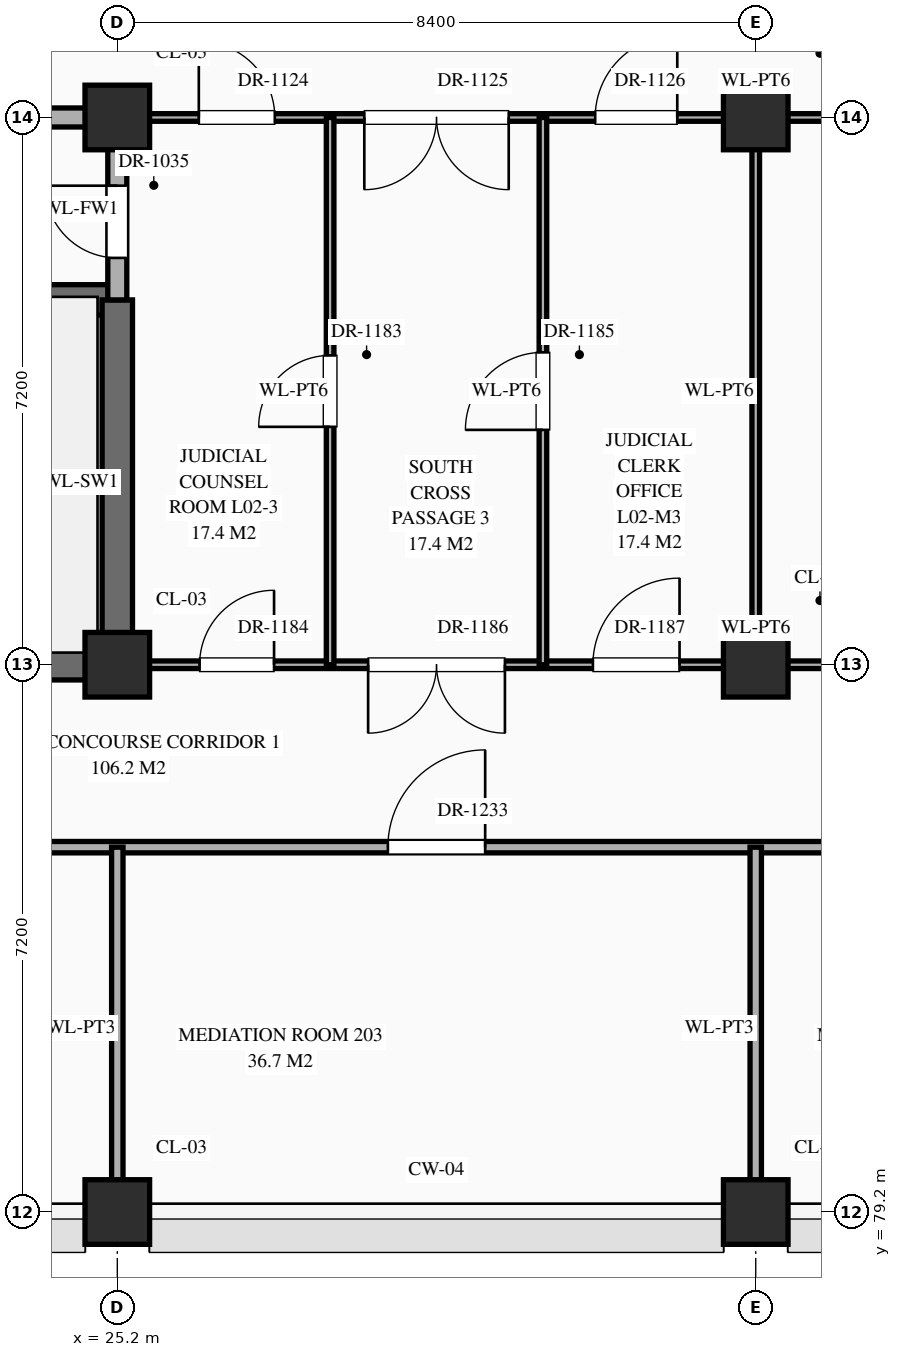
"""IFC4 building model, lengths in metres.
Left out: names, types, materials, properties, quantities, classifications, styles, units other than length and angle.
Written with IfcOpenShell. Run it as: python <this file> out.ifc"""

import sys

from ifc_helpers import new_model, si_unit, direction, frame, frame_2d, origin, origin_2d, place, context, subcontext, project, spatial, rectangle, extrude, element, fill, save


model = new_model("IFC4")
c1 = context("Model", 3, precision=1e-05, world=origin(), true_north=direction((0.0, 1.0)))
c2 = subcontext(c1, "Body", "Model", "MODEL_VIEW")
j1 = project(units=[si_unit("LENGTHUNIT", "METRE"), si_unit("PLANEANGLEUNIT", "RADIAN")], contexts=[c1])
p1 = place(None, origin())
s1 = spatial("IfcSite", under=j1, at=p1, CompositionType="ELEMENT")
p2 = place(p1, origin())
s2 = spatial("IfcBuilding", under=s1, at=p2, CompositionType="ELEMENT")
p3 = place(p2, frame((0.0, 0.0, 5.4)))
s3 = spatial("IfcBuildingStorey", under=s2, at=p3, CompositionType="ELEMENT", Elevation=5.4)
for number, where, z_axis, x_axis in (
    (1, (25.2, 79.2, 0.0), (0.0, 0.0, 1.0), (1.0, 0.0, 0.0)),
    (2, (25.2, 86.4, 0.0), (0.0, 0.0, 1.0), (1.0, 0.0, 0.0)),
    (3, (25.2, 93.6, 0.0), (0.0, 0.0, 1.0), (1.0, 0.0, 0.0)),
    (4, (33.6, 79.2, 0.0), (0.0, 0.0, 1.0), (1.0, 0.0, 0.0)),
    (5, (33.6, 86.4, 0.0), (0.0, 0.0, 1.0), (1.0, 0.0, 0.0)),
    (6, (33.6, 93.6, 0.0), (0.0, 0.0, 1.0), (1.0, 0.0, 0.0)),
):
    element("IfcColumn", number, at=place(p3, frame(where, z_axis=z_axis, x_axis=x_axis)), inside=s3, PredefinedType="COLUMN", context=c2, shape_type="SweptSolid", body=[
        extrude(rectangle(XDim=0.85, YDim=0.85, at=origin_2d()), origin(), (0.0, 0.0, 1.0), 5.4),
    ])
p4 = place(p3, frame((16.8, 84.0, 0.0), z_axis=(0.0, 0.0, 1.0), x_axis=(1.0, 0.0, 0.0)))
e7 = element("IfcWall", 7, at=p4, inside=s3, PredefinedType="STANDARD", context=c2, shape_type="SweptSolid", body=[
    extrude(rectangle(XDim=134.4, YDim=0.15, at=frame_2d((67.2, 0.0))), origin(), (0.0, 0.0, 1.0), 5.12),
])
p5 = place(p4, frame((3.58, 0.0, 0.0)))
e8 = element("IfcOpeningElement", 8, at=p5, cuts=e7, PredefinedType="OPENING", context=c2, shape_type="SweptSolid", body=[
    extrude(rectangle(XDim=1.24, YDim=2.3, at=frame_2d((0.62, 1.15))), frame((0.0, 0.087, 0.0), z_axis=(0.0, -1.0, 0.0), x_axis=(1.0, 0.0, 0.0)), (0.0, 0.0, 1.0), 0.174),
])
p6 = place(p4, frame((11.96, 0.0, 0.0)))
e9 = element("IfcOpeningElement", 9, at=p6, cuts=e7, PredefinedType="OPENING", context=c2, shape_type="SweptSolid", body=[
    extrude(rectangle(XDim=1.28, YDim=2.35, at=frame_2d((0.64, 1.175))), frame((0.0, 0.087, 0.0), z_axis=(0.0, -1.0, 0.0), x_axis=(1.0, 0.0, 0.0)), (0.0, 0.0, 1.0), 0.174),
])
p7 = place(p4, frame((20.53, 0.0, 0.0)))
e10 = element("IfcOpeningElement", 10, at=p7, cuts=e7, PredefinedType="OPENING", context=c2, shape_type="SweptSolid", body=[
    extrude(rectangle(XDim=0.94, YDim=2.3, at=frame_2d((0.47, 1.15))), frame((0.0, 0.087, 0.0), z_axis=(0.0, -1.0, 0.0), x_axis=(1.0, 0.0, 0.0)), (0.0, 0.0, 1.0), 0.174),
])
p8 = place(p4, frame((28.91, 0.0, 0.0)))
e11 = element("IfcOpeningElement", 11, at=p8, cuts=e7, PredefinedType="OPENING", context=c2, shape_type="SweptSolid", body=[
    extrude(rectangle(XDim=0.98, YDim=2.35, at=frame_2d((0.49, 1.175))), frame((0.0, 0.087, 0.0), z_axis=(0.0, -1.0, 0.0), x_axis=(1.0, 0.0, 0.0)), (0.0, 0.0, 1.0), 0.174),
])
p9 = place(p4, frame((37.27, 0.0, 0.0)))
e12 = element("IfcOpeningElement", 12, at=p9, cuts=e7, PredefinedType="OPENING", context=c2, shape_type="SweptSolid", body=[
    extrude(rectangle(XDim=1.06, YDim=2.4, at=frame_2d((0.53, 1.2))), frame((0.0, 0.087, 0.0), z_axis=(0.0, -1.0, 0.0), x_axis=(1.0, 0.0, 0.0)), (0.0, 0.0, 1.0), 0.174),
])
p10 = place(p4, frame((45.63, 0.0, 0.0)))
e13 = element("IfcOpeningElement", 13, at=p10, cuts=e7, PredefinedType="OPENING", context=c2, shape_type="SweptSolid", body=[
    extrude(rectangle(XDim=1.14, YDim=2.4, at=frame_2d((0.57, 1.2))), frame((0.0, 0.087, 0.0), z_axis=(0.0, -1.0, 0.0), x_axis=(1.0, 0.0, 0.0)), (0.0, 0.0, 1.0), 0.174),
])
p11 = place(p4, frame((54.15, 0.0, 0.0)))
e14 = element("IfcOpeningElement", 14, at=p11, cuts=e7, PredefinedType="OPENING", context=c2, shape_type="SweptSolid", body=[
    extrude(rectangle(XDim=0.9, YDim=2.15, at=frame_2d((0.45, 1.075))), frame((0.0, 0.087, 0.0), z_axis=(0.0, -1.0, 0.0), x_axis=(1.0, 0.0, 0.0)), (0.0, 0.0, 1.0), 0.174),
])
p12 = place(p4, frame((62.57, 0.0, 0.0)))
e15 = element("IfcOpeningElement", 15, at=p12, cuts=e7, PredefinedType="OPENING", context=c2, shape_type="SweptSolid", body=[
    extrude(rectangle(XDim=0.86, YDim=2.1, at=frame_2d((0.43, 1.05))), frame((0.0, 0.087, 0.0), z_axis=(0.0, -1.0, 0.0), x_axis=(1.0, 0.0, 0.0)), (0.0, 0.0, 1.0), 0.174),
])
p13 = place(p4, frame((70.92, 0.0, 0.0)))
e16 = element("IfcOpeningElement", 16, at=p13, cuts=e7, PredefinedType="OPENING", context=c2, shape_type="SweptSolid", body=[
    extrude(rectangle(XDim=0.96, YDim=2.2, at=frame_2d((0.48, 1.1))), frame((0.0, 0.087, 0.0), z_axis=(0.0, -1.0, 0.0), x_axis=(1.0, 0.0, 0.0)), (0.0, 0.0, 1.0), 0.174),
])
p14 = place(p4, frame((79.3, 0.0, 0.0)))
e17 = element("IfcOpeningElement", 17, at=p14, cuts=e7, PredefinedType="OPENING", context=c2, shape_type="SweptSolid", body=[
    extrude(rectangle(XDim=1.0, YDim=2.25, at=frame_2d((0.5, 1.125))), frame((0.0, 0.087, 0.0), z_axis=(0.0, -1.0, 0.0), x_axis=(1.0, 0.0, 0.0)), (0.0, 0.0, 1.0), 0.174),
])
p15 = place(p4, frame((87.68, 0.0, 0.0)))
e18 = element("IfcOpeningElement", 18, at=p15, cuts=e7, PredefinedType="OPENING", context=c2, shape_type="SweptSolid", body=[
    extrude(rectangle(XDim=1.04, YDim=2.2, at=frame_2d((0.52, 1.1))), frame((0.0, 0.087, 0.0), z_axis=(0.0, -1.0, 0.0), x_axis=(1.0, 0.0, 0.0)), (0.0, 0.0, 1.0), 0.174),
])
p16 = place(p4, frame((96.06, 0.0, 0.0)))
e19 = element("IfcOpeningElement", 19, at=p16, cuts=e7, PredefinedType="OPENING", context=c2, shape_type="SweptSolid", body=[
    extrude(rectangle(XDim=1.08, YDim=2.25, at=frame_2d((0.54, 1.125))), frame((0.0, 0.087, 0.0), z_axis=(0.0, -1.0, 0.0), x_axis=(1.0, 0.0, 0.0)), (0.0, 0.0, 1.0), 0.174),
])
p17 = place(p4, frame((104.44, 0.0, 0.0)))
e20 = element("IfcOpeningElement", 20, at=p17, cuts=e7, PredefinedType="OPENING", context=c2, shape_type="SweptSolid", body=[
    extrude(rectangle(XDim=1.12, YDim=2.25, at=frame_2d((0.56, 1.125))), frame((0.0, 0.087, 0.0), z_axis=(0.0, -1.0, 0.0), x_axis=(1.0, 0.0, 0.0)), (0.0, 0.0, 1.0), 0.174),
])
p18 = place(p4, frame((112.82, 0.0, 0.0)))
e21 = element("IfcOpeningElement", 21, at=p18, cuts=e7, PredefinedType="OPENING", context=c2, shape_type="SweptSolid", body=[
    extrude(rectangle(XDim=1.16, YDim=2.3, at=frame_2d((0.58, 1.15))), frame((0.0, 0.087, 0.0), z_axis=(0.0, -1.0, 0.0), x_axis=(1.0, 0.0, 0.0)), (0.0, 0.0, 1.0), 0.174),
])
p19 = place(p4, frame((121.2, 0.0, 0.0)))
e22 = element("IfcOpeningElement", 22, at=p19, cuts=e7, PredefinedType="OPENING", context=c2, shape_type="SweptSolid", body=[
    extrude(rectangle(XDim=1.2, YDim=2.35, at=frame_2d((0.6, 1.175))), frame((0.0, 0.087, 0.0), z_axis=(0.0, -1.0, 0.0), x_axis=(1.0, 0.0, 0.0)), (0.0, 0.0, 1.0), 0.174),
])
p20 = place(p4, frame((129.58, 0.0, 0.0)))
e23 = element("IfcOpeningElement", 23, at=p20, cuts=e7, PredefinedType="OPENING", context=c2, shape_type="SweptSolid", body=[
    extrude(rectangle(XDim=1.24, YDim=2.3, at=frame_2d((0.62, 1.15))), frame((0.0, 0.087, 0.0), z_axis=(0.0, -1.0, 0.0), x_axis=(1.0, 0.0, 0.0)), (0.0, 0.0, 1.0), 0.174),
])
p21 = place(p3, frame((16.8, 86.4, 0.0), z_axis=(0.0, 0.0, 1.0), x_axis=(1.0, 0.0, 0.0)))
e24 = element("IfcWall", 24, at=p21, inside=s3, PredefinedType="SHEAR", context=c2, shape_type="SweptSolid", body=[
    extrude(rectangle(XDim=8.4, YDim=0.4, at=frame_2d((4.2, 0.0))), origin(), (0.0, 0.0, 1.0), 5.12),
])
p22 = place(p3, frame((25.2, 86.4, 0.0), z_axis=(0.0, 0.0, 1.0), x_axis=(1.0, 0.0, 0.0)))
e25 = element("IfcWall", 25, at=p22, inside=s3, PredefinedType="STANDARD", context=c2, shape_type="SweptSolid", body=[
    extrude(rectangle(XDim=16.8, YDim=0.1, at=frame_2d((8.4, 0.0))), origin(), (0.0, 0.0, 1.0), 4.27),
])
p23 = place(p22, frame((1.083, 0.0, 0.0)))
e26 = element("IfcOpeningElement", 26, at=p23, cuts=e25, PredefinedType="OPENING", context=c2, shape_type="SweptSolid", body=[
    extrude(rectangle(XDim=0.98, YDim=2.35, at=frame_2d((0.49, 1.175))), frame((0.0, 0.062, 0.0), z_axis=(0.0, -1.0, 0.0), x_axis=(1.0, 0.0, 0.0)), (0.0, 0.0, 1.0), 0.124),
])
p24 = place(p22, frame((3.3, 0.0, 0.0)))
e27 = element("IfcOpeningElement", 27, at=p24, cuts=e25, PredefinedType="OPENING", context=c2, shape_type="SweptSolid", body=[
    extrude(rectangle(XDim=1.8, YDim=2.5, at=frame_2d((0.9, 1.25))), frame((0.0, 0.062, 0.0), z_axis=(0.0, -1.0, 0.0), x_axis=(1.0, 0.0, 0.0)), (0.0, 0.0, 1.0), 0.124),
])
p25 = place(p22, frame((6.258, 0.0, 0.0)))
e28 = element("IfcOpeningElement", 28, at=p25, cuts=e25, PredefinedType="OPENING", context=c2, shape_type="SweptSolid", body=[
    extrude(rectangle(XDim=1.14, YDim=2.4, at=frame_2d((0.57, 1.2))), frame((0.0, 0.062, 0.0), z_axis=(0.0, -1.0, 0.0), x_axis=(1.0, 0.0, 0.0)), (0.0, 0.0, 1.0), 0.124),
])
p26 = place(p22, frame((12.15, 0.0, 0.0)))
e29 = element("IfcOpeningElement", 29, at=p26, cuts=e25, PredefinedType="OPENING", context=c2, shape_type="SweptSolid", body=[
    extrude(rectangle(XDim=0.9, YDim=2.15, at=frame_2d((0.45, 1.075))), frame((0.0, 0.062, 0.0), z_axis=(0.0, -1.0, 0.0), x_axis=(1.0, 0.0, 0.0)), (0.0, 0.0, 1.0), 0.124),
])
p27 = place(p3, frame((16.8, 91.2, 0.0), z_axis=(0.0, 0.0, 1.0), x_axis=(1.0, 0.0, 0.0)))
e30 = element("IfcWall", 30, at=p27, inside=s3, PredefinedType="SHEAR", context=c2, shape_type="SweptSolid", body=[
    extrude(rectangle(XDim=8.4, YDim=0.4, at=frame_2d((4.2, 0.0))), origin(), (0.0, 0.0, 1.0), 5.12),
])
p28 = place(p27, frame((0.65, 0.0, 0.0)))
e31 = element("IfcOpeningElement", 31, at=p28, cuts=e30, PredefinedType="OPENING", context=c2, shape_type="SweptSolid", body=[
    extrude(rectangle(XDim=1.1, YDim=2.2, at=frame_2d((0.55, 1.1))), frame((0.0, 0.212, 0.0), z_axis=(0.0, -1.0, 0.0), x_axis=(1.0, 0.0, 0.0)), (0.0, 0.0, 1.0), 0.424),
])
p29 = place(p3, frame((16.8, 93.6, 0.0), z_axis=(0.0, 0.0, 1.0), x_axis=(1.0, 0.0, 0.0)))
e32 = element("IfcWall", 32, at=p29, inside=s3, PredefinedType="STANDARD", context=c2, shape_type="SweptSolid", body=[
    extrude(rectangle(XDim=8.4, YDim=0.25, at=frame_2d((4.2, 0.0))), origin(), (0.0, 0.0, 1.0), 4.27),
])
p30 = place(p29, frame((3.2, 0.0, 0.0)))
e33 = element("IfcOpeningElement", 33, at=p30, cuts=e32, PredefinedType="OPENING", context=c2, shape_type="SweptSolid", body=[
    extrude(rectangle(XDim=2.0, YDim=2.4, at=frame_2d((1.0, 1.2))), frame((0.0, 0.137, 0.0), z_axis=(0.0, -1.0, 0.0), x_axis=(1.0, 0.0, 0.0)), (0.0, 0.0, 1.0), 0.274),
])
p31 = place(p3, frame((25.2, 93.6, 0.0), z_axis=(0.0, 0.0, 1.0), x_axis=(1.0, 0.0, 0.0)))
e34 = element("IfcWall", 34, at=p31, inside=s3, PredefinedType="STANDARD", context=c2, shape_type="SweptSolid", body=[
    extrude(rectangle(XDim=16.8, YDim=0.1, at=frame_2d((8.4, 0.0))), origin(), (0.0, 0.0, 1.0), 4.27),
])
p32 = place(p31, frame((1.073, 0.0, 0.0)))
e35 = element("IfcOpeningElement", 35, at=p32, cuts=e34, PredefinedType="OPENING", context=c2, shape_type="SweptSolid", body=[
    extrude(rectangle(XDim=1.0, YDim=2.25, at=frame_2d((0.5, 1.125))), frame((0.0, 0.062, 0.0), z_axis=(0.0, -1.0, 0.0), x_axis=(1.0, 0.0, 0.0)), (0.0, 0.0, 1.0), 0.124),
])
p33 = place(p31, frame((3.25, 0.0, 0.0)))
e36 = element("IfcOpeningElement", 36, at=p33, cuts=e34, PredefinedType="OPENING", context=c2, shape_type="SweptSolid", body=[
    extrude(rectangle(XDim=1.9, YDim=2.5, at=frame_2d((0.95, 1.25))), frame((0.0, 0.062, 0.0), z_axis=(0.0, -1.0, 0.0), x_axis=(1.0, 0.0, 0.0)), (0.0, 0.0, 1.0), 0.124),
])
p34 = place(p31, frame((6.288, 0.0, 0.0)))
e37 = element("IfcOpeningElement", 37, at=p34, cuts=e34, PredefinedType="OPENING", context=c2, shape_type="SweptSolid", body=[
    extrude(rectangle(XDim=1.08, YDim=2.25, at=frame_2d((0.54, 1.125))), frame((0.0, 0.062, 0.0), z_axis=(0.0, -1.0, 0.0), x_axis=(1.0, 0.0, 0.0)), (0.0, 0.0, 1.0), 0.124),
])
p35 = place(p31, frame((12.04, 0.0, 0.0)))
e38 = element("IfcOpeningElement", 38, at=p35, cuts=e34, PredefinedType="OPENING", context=c2, shape_type="SweptSolid", body=[
    extrude(rectangle(XDim=1.12, YDim=2.25, at=frame_2d((0.56, 1.125))), frame((0.0, 0.062, 0.0), z_axis=(0.0, -1.0, 0.0), x_axis=(1.0, 0.0, 0.0)), (0.0, 0.0, 1.0), 0.124),
])
p36 = place(p3, frame((25.2, 79.24, 0.0), z_axis=(0.0, 0.0, 1.0), x_axis=(0.0, 1.0, 0.0)))
e39 = element("IfcWall", 39, at=p36, inside=s3, PredefinedType="STANDARD", context=c2, shape_type="SweptSolid", body=[
    extrude(rectangle(XDim=4.76, YDim=0.15, at=frame_2d((2.38, 0.0))), origin(), (0.0, 0.0, 1.0), 4.37),
])
p37 = place(p3, frame((25.2, 86.4, 0.0), z_axis=(0.0, 0.0, 1.0), x_axis=(0.0, 1.0, 0.0)))
e40 = element("IfcWall", 40, at=p37, inside=s3, PredefinedType="SHEAR", context=c2, shape_type="SweptSolid", body=[
    extrude(rectangle(XDim=4.8, YDim=0.4, at=frame_2d((2.4, 0.0))), origin(), (0.0, 0.0, 1.0), 5.12),
])
p38 = place(p3, frame((25.2, 91.2, 0.0), z_axis=(0.0, 0.0, 1.0), x_axis=(0.0, 1.0, 0.0)))
e41 = element("IfcWall", 41, at=p38, inside=s3, PredefinedType="STANDARD", context=c2, shape_type="SweptSolid", body=[
    extrude(rectangle(XDim=2.4, YDim=0.25, at=frame_2d((1.2, 0.0))), origin(), (0.0, 0.0, 1.0), 4.37),
])
p39 = place(p38, frame((0.552, 0.0, 0.0)))
e42 = element("IfcOpeningElement", 42, at=p39, cuts=e41, PredefinedType="OPENING", context=c2, shape_type="SweptSolid", body=[
    extrude(rectangle(XDim=0.95, YDim=2.15, at=frame_2d((0.475, 1.075))), frame((0.0, 0.137, 0.0), z_axis=(0.0, -1.0, 0.0), x_axis=(1.0, 0.0, 0.0)), (0.0, 0.0, 1.0), 0.274),
])
p40 = place(p3, frame((28.0, 86.4, 0.0), z_axis=(0.0, 0.0, 1.0), x_axis=(0.0, 1.0, 0.0)))
e43 = element("IfcWall", 43, at=p40, inside=s3, PredefinedType="STANDARD", context=c2, shape_type="SweptSolid", body=[
    extrude(rectangle(XDim=7.2, YDim=0.1, at=frame_2d((3.6, 0.0))), origin(), (0.0, 0.0, 1.0), 5.12),
])
p41 = place(p40, frame((3.13, 0.0, 0.0)))
e44 = element("IfcOpeningElement", 44, at=p41, cuts=e43, PredefinedType="OPENING", context=c2, shape_type="SweptSolid", body=[
    extrude(rectangle(XDim=0.94, YDim=2.3, at=frame_2d((0.47, 1.15))), frame((0.0, 0.062, 0.0), z_axis=(0.0, -1.0, 0.0), x_axis=(1.0, 0.0, 0.0)), (0.0, 0.0, 1.0), 0.124),
])
p42 = place(p3, frame((30.8, 86.4, 0.0), z_axis=(0.0, 0.0, 1.0), x_axis=(0.0, 1.0, 0.0)))
e45 = element("IfcWall", 45, at=p42, inside=s3, PredefinedType="STANDARD", context=c2, shape_type="SweptSolid", body=[
    extrude(rectangle(XDim=7.2, YDim=0.1, at=frame_2d((3.6, 0.0))), origin(), (0.0, 0.0, 1.0), 5.12),
])
p43 = place(p42, frame((3.09, 0.0, 0.0)))
e46 = element("IfcOpeningElement", 46, at=p43, cuts=e45, PredefinedType="OPENING", context=c2, shape_type="SweptSolid", body=[
    extrude(rectangle(XDim=1.02, YDim=2.4, at=frame_2d((0.51, 1.2))), frame((0.0, 0.062, 0.0), z_axis=(0.0, -1.0, 0.0), x_axis=(1.0, 0.0, 0.0)), (0.0, 0.0, 1.0), 0.124),
])
p44 = place(p3, frame((33.6, 79.24, 0.0), z_axis=(0.0, 0.0, 1.0), x_axis=(0.0, 1.0, 0.0)))
e47 = element("IfcWall", 47, at=p44, inside=s3, PredefinedType="STANDARD", context=c2, shape_type="SweptSolid", body=[
    extrude(rectangle(XDim=4.76, YDim=0.15, at=frame_2d((2.38, 0.0))), origin(), (0.0, 0.0, 1.0), 4.37),
])
p45 = place(p3, frame((33.6, 86.4, 0.0), z_axis=(0.0, 0.0, 1.0), x_axis=(0.0, 1.0, 0.0)))
e48 = element("IfcWall", 48, at=p45, inside=s3, PredefinedType="STANDARD", context=c2, shape_type="SweptSolid", body=[
    extrude(rectangle(XDim=7.2, YDim=0.1, at=frame_2d((3.6, 0.0))), origin(), (0.0, 0.0, 1.0), 4.37),
])
p46 = place(p39, origin())
e49 = element("IfcDoor", 49, at=p46, inside=s3, OperationType="SINGLE_SWING_RIGHT", PredefinedType="DOOR", context=c2, shape_type="SweptSolid", body=[
    extrude(rectangle(XDim=0.95, YDim=2.15, at=frame_2d((0.475, 1.075))), frame((0.0, 0.025, 0.0), z_axis=(0.0, -1.0, 0.0), x_axis=(1.0, 0.0, 0.0)), (0.0, 0.0, 1.0), 0.05),
])
fill(e42, e49)
p47 = place(p32, origin())
e50 = element("IfcDoor", 50, at=p47, inside=s3, OperationType="SINGLE_SWING_LEFT", PredefinedType="DOOR", context=c2, shape_type="SweptSolid", body=[
    extrude(rectangle(XDim=1.0, YDim=2.25, at=frame_2d((0.5, 1.125))), frame((0.0, 0.025, 0.0), z_axis=(0.0, -1.0, 0.0), x_axis=(1.0, 0.0, 0.0)), (0.0, 0.0, 1.0), 0.05),
])
fill(e35, e50)
p48 = place(p33, frame((1.9, 0.0, 0.0), z_axis=(0.0, 0.0, 1.0), x_axis=(-1.0, 0.0, 0.0)))
e51 = element("IfcDoor", 51, at=p48, inside=s3, OperationType="DOUBLE_DOOR_SINGLE_SWING", PredefinedType="DOOR", context=c2, shape_type="SweptSolid", body=[
    extrude(rectangle(XDim=1.9, YDim=2.5, at=frame_2d((0.95, 1.25))), frame((0.0, 0.025, 0.0), z_axis=(0.0, -1.0, 0.0), x_axis=(1.0, 0.0, 0.0)), (0.0, 0.0, 1.0), 0.05),
])
fill(e36, e51)
p49 = place(p34, origin())
e52 = element("IfcDoor", 52, at=p49, inside=s3, OperationType="SINGLE_SWING_RIGHT", PredefinedType="DOOR", context=c2, shape_type="SweptSolid", body=[
    extrude(rectangle(XDim=1.08, YDim=2.25, at=frame_2d((0.54, 1.125))), frame((0.0, 0.025, 0.0), z_axis=(0.0, -1.0, 0.0), x_axis=(1.0, 0.0, 0.0)), (0.0, 0.0, 1.0), 0.05),
])
fill(e37, e52)
p50 = place(p41, origin())
e53 = element("IfcDoor", 53, at=p50, inside=s3, OperationType="SINGLE_SWING_LEFT", PredefinedType="DOOR", context=c2, shape_type="SweptSolid", body=[
    extrude(rectangle(XDim=0.94, YDim=2.3, at=frame_2d((0.47, 1.15))), frame((0.0, 0.025, 0.0), z_axis=(0.0, -1.0, 0.0), x_axis=(1.0, 0.0, 0.0)), (0.0, 0.0, 1.0), 0.05),
])
fill(e44, e53)
p51 = place(p23, origin())
e54 = element("IfcDoor", 54, at=p51, inside=s3, OperationType="SINGLE_SWING_RIGHT", PredefinedType="DOOR", context=c2, shape_type="SweptSolid", body=[
    extrude(rectangle(XDim=0.98, YDim=2.35, at=frame_2d((0.49, 1.175))), frame((0.0, 0.025, 0.0), z_axis=(0.0, -1.0, 0.0), x_axis=(1.0, 0.0, 0.0)), (0.0, 0.0, 1.0), 0.05),
])
fill(e26, e54)
p52 = place(p43, origin())
e55 = element("IfcDoor", 55, at=p52, inside=s3, OperationType="SINGLE_SWING_LEFT", PredefinedType="DOOR", context=c2, shape_type="SweptSolid", body=[
    extrude(rectangle(XDim=1.02, YDim=2.4, at=frame_2d((0.51, 1.2))), frame((0.0, 0.025, 0.0), z_axis=(0.0, -1.0, 0.0), x_axis=(1.0, 0.0, 0.0)), (0.0, 0.0, 1.0), 0.05),
])
fill(e46, e55)
p53 = place(p24, frame((1.8, 0.0, 0.0), z_axis=(0.0, 0.0, 1.0), x_axis=(-1.0, 0.0, 0.0)))
e56 = element("IfcDoor", 56, at=p53, inside=s3, OperationType="DOUBLE_DOOR_SINGLE_SWING", PredefinedType="DOOR", context=c2, shape_type="SweptSolid", body=[
    extrude(rectangle(XDim=1.8, YDim=2.5, at=frame_2d((0.9, 1.25))), frame((0.0, 0.025, 0.0), z_axis=(0.0, -1.0, 0.0), x_axis=(1.0, 0.0, 0.0)), (0.0, 0.0, 1.0), 0.05),
])
fill(e27, e56)
p54 = place(p25, origin())
e57 = element("IfcDoor", 57, at=p54, inside=s3, OperationType="SINGLE_SWING_RIGHT", PredefinedType="DOOR", context=c2, shape_type="SweptSolid", body=[
    extrude(rectangle(XDim=1.14, YDim=2.4, at=frame_2d((0.57, 1.2))), frame((0.0, 0.025, 0.0), z_axis=(0.0, -1.0, 0.0), x_axis=(1.0, 0.0, 0.0)), (0.0, 0.0, 1.0), 0.05),
])
fill(e28, e57)
p55 = place(p6, origin())
e58 = element("IfcDoor", 58, at=p55, inside=s3, OperationType="SINGLE_SWING_RIGHT", PredefinedType="DOOR", context=c2, shape_type="SweptSolid", body=[
    extrude(rectangle(XDim=1.28, YDim=2.35, at=frame_2d((0.64, 1.175))), frame((0.0, 0.025, 0.0), z_axis=(0.0, -1.0, 0.0), x_axis=(1.0, 0.0, 0.0)), (0.0, 0.0, 1.0), 0.05),
])
fill(e9, e58)
save(model, sys.argv[1])
